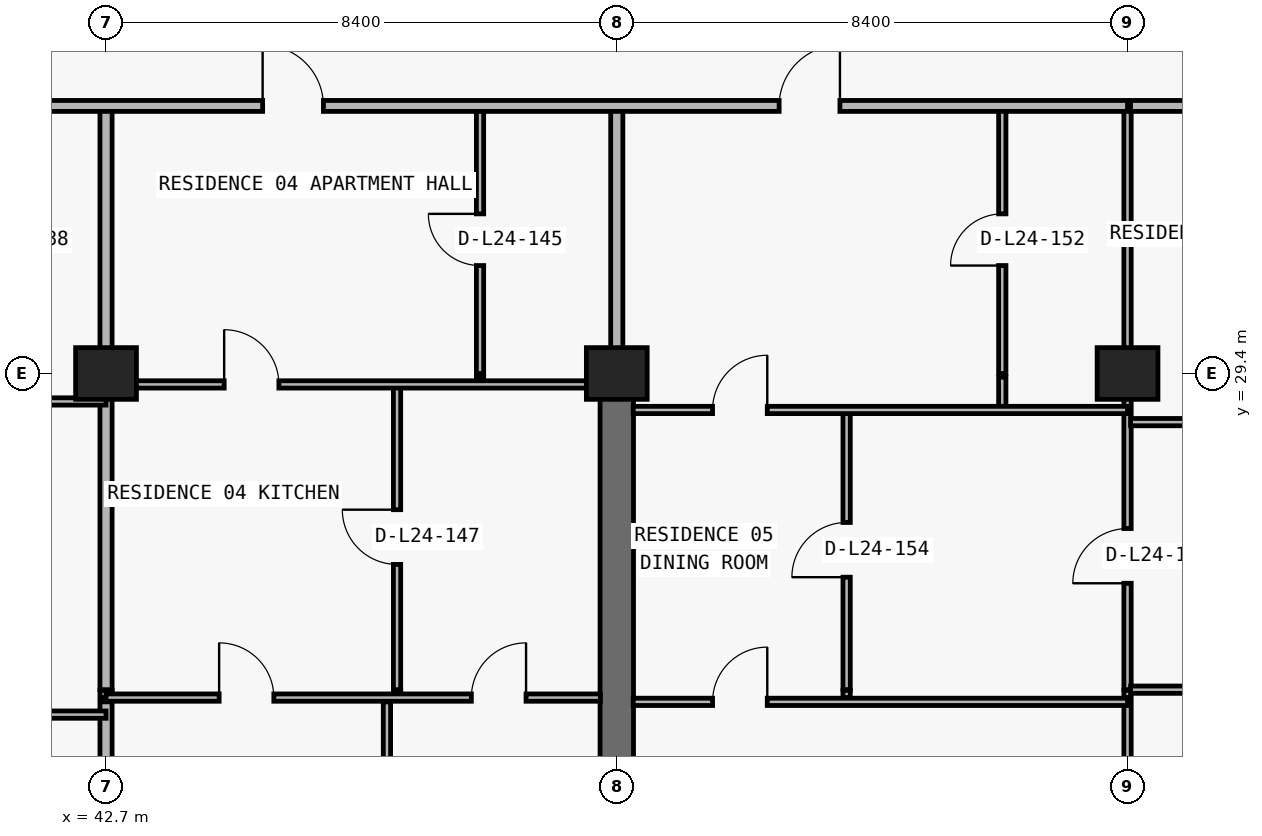
"""IFC4 building model, lengths in metres.
Left out: names, types, materials, properties, quantities, classifications, styles, units other than length and angle.
Written with IfcOpenShell. Run it as: python <this file> out.ifc"""

import sys

from ifc_helpers import new_model, si_unit, direction, frame, frame_2d, origin, origin_2d, place, context, subcontext, project, spatial, rectangle, extrude, element, fill, save


model = new_model("IFC4")
c1 = context("Model", 3, precision=1e-05, world=origin(), true_north=direction((0.0, 1.0)))
c2 = subcontext(c1, "Body", "Model", "MODEL_VIEW")
j1 = project(units=[si_unit("LENGTHUNIT", "METRE"), si_unit("PLANEANGLEUNIT", "RADIAN")], contexts=[c1])
p1 = place(None, origin())
s1 = spatial("IfcSite", under=j1, at=p1, CompositionType="ELEMENT")
p2 = place(p1, origin())
s2 = spatial("IfcBuilding", under=s1, at=p2, CompositionType="ELEMENT")
p3 = place(p2, frame((0.0, 0.0, 91.2)))
s3 = spatial("IfcBuildingStorey", under=s2, at=p3, CompositionType="ELEMENT", Elevation=91.2)
for number, where, z_axis, x_axis in (
    (1, (42.7, 29.4, 0.0), (0.0, 0.0, 1.0), (1.0, 0.0, 0.0)),
    (2, (51.1, 29.4, 0.0), (0.0, 0.0, 1.0), (1.0, 0.0, 0.0)),
    (3, (59.5, 29.4, 0.0), (0.0, 0.0, 1.0), (1.0, 0.0, 0.0)),
):
    element("IfcColumn", number, at=place(p3, frame(where, z_axis=z_axis, x_axis=x_axis)), inside=s3, PredefinedType="COLUMN", context=c2, shape_type="SweptSolid", body=[
        extrude(rectangle(XDim=1.0, YDim=0.85, at=origin_2d()), origin(), (0.0, 0.0, 1.0), 3.05),
    ])
p4 = place(p3, frame((51.1, 20.8, 0.0), z_axis=(0.0, 0.0, 1.0), x_axis=(0.0, 1.0, 0.0)))
e4 = element("IfcWall", 4, at=p4, inside=s3, PredefinedType="SHEAR", context=c2, shape_type="SweptSolid", body=[
    extrude(rectangle(XDim=8.6, YDim=0.55, at=frame_2d((4.3, 0.0))), origin(), (0.0, 0.0, 1.0), 3.05),
])
p5 = place(p3, frame((42.7, 8.84, 0.0), z_axis=(0.0, 0.0, 1.0), x_axis=(0.0, 1.0, 0.0)))
e5 = element("IfcWall", 5, at=p5, inside=s3, PredefinedType="PARTITIONING", context=c2, shape_type="SweptSolid", body=[
    extrude(rectangle(XDim=15.16, YDim=0.2, at=frame_2d((7.58, 0.0))), origin(), (0.0, 0.0, 1.0), 2.174),
])
p6 = place(p3, frame((42.7, 24.07, 0.0), z_axis=(0.0, 0.0, 1.0), x_axis=(0.0, 1.0, 0.0)))
e6 = element("IfcWall", 6, at=p6, inside=s3, PredefinedType="PARTITIONING", context=c2, shape_type="SweptSolid", body=[
    extrude(rectangle(XDim=0.12, YDim=0.2, at=frame_2d((0.06, 0.0))), origin(), (0.0, 0.0, 1.0), 2.174),
])
p7 = place(p3, frame((42.7, 24.2, 0.0), z_axis=(0.0, 0.0, 1.0), x_axis=(0.0, 1.0, 0.0)))
e7 = element("IfcWall", 7, at=p7, inside=s3, PredefinedType="PARTITIONING", context=c2, shape_type="SweptSolid", body=[
    extrude(rectangle(XDim=5.14, YDim=0.2, at=frame_2d((2.57, 0.0))), origin(), (0.0, 0.0, 1.0), 2.174),
])
p8 = place(p3, frame((42.7, 29.4, 0.0), z_axis=(0.0, 0.0, 1.0), x_axis=(0.0, 1.0, 0.0)))
e8 = element("IfcWall", 8, at=p8, inside=s3, PredefinedType="PARTITIONING", context=c2, shape_type="SweptSolid", body=[
    extrude(rectangle(XDim=4.4, YDim=0.2, at=frame_2d((2.2, 0.0))), origin(), (0.0, 0.0, 1.0), 2.174),
])
p9 = place(p3, frame((47.32, 8.84, 0.0), z_axis=(0.0, 0.0, 1.0), x_axis=(0.0, 1.0, 0.0)))
e9 = element("IfcWall", 9, at=p9, inside=s3, PredefinedType="PARTITIONING", context=c2, shape_type="SweptSolid", body=[
    extrude(rectangle(XDim=15.16, YDim=0.12, at=frame_2d((7.58, 0.0))), origin(), (0.0, 0.0, 1.0), 3.05),
])
p10 = place(p3, frame((47.486, 24.07, 0.0), z_axis=(0.0, 0.0, 1.0), x_axis=(0.0, 1.0, 0.0)))
e10 = element("IfcWall", 10, at=p10, inside=s3, PredefinedType="PARTITIONING", context=c2, shape_type="SweptSolid", body=[
    extrude(rectangle(XDim=0.12, YDim=0.12, at=frame_2d((0.06, 0.0))), origin(), (0.0, 0.0, 1.0), 3.05),
])
p11 = place(p3, frame((47.486, 24.2, 0.0), z_axis=(0.0, 0.0, 1.0), x_axis=(0.0, 1.0, 0.0)))
e11 = element("IfcWall", 11, at=p11, inside=s3, PredefinedType="PARTITIONING", context=c2, shape_type="SweptSolid", body=[
    extrude(rectangle(XDim=5.02, YDim=0.12, at=frame_2d((2.51, 0.0))), origin(), (0.0, 0.0, 1.0), 3.05),
])
p12 = place(p11, frame((2.06, 0.0, 0.0)))
e12 = element("IfcOpeningElement", 12, at=p12, cuts=e11, PredefinedType="OPENING", context=c2, shape_type="SweptSolid", body=[
    extrude(rectangle(XDim=0.9, YDim=2.15, at=frame_2d((0.45, 1.075))), frame((0.0, 0.07, 0.0), z_axis=(0.0, -1.0, 0.0), x_axis=(1.0, 0.0, 0.0)), (0.0, 0.0, 1.0), 0.14),
])
p13 = place(p3, frame((48.851, 29.22, 0.0), z_axis=(0.0, 0.0, 1.0), x_axis=(0.0, 1.0, 0.0)))
e13 = element("IfcWall", 13, at=p13, inside=s3, PredefinedType="PARTITIONING", context=c2, shape_type="SweptSolid", body=[
    extrude(rectangle(XDim=0.12, YDim=0.12, at=frame_2d((0.06, 0.0))), origin(), (0.0, 0.0, 1.0), 3.05),
])
p14 = place(p3, frame((48.851, 29.4, 0.0), z_axis=(0.0, 0.0, 1.0), x_axis=(0.0, 1.0, 0.0)))
e14 = element("IfcWall", 14, at=p14, inside=s3, PredefinedType="PARTITIONING", context=c2, shape_type="SweptSolid", body=[
    extrude(rectangle(XDim=4.4, YDim=0.12, at=frame_2d((2.2, 0.0))), origin(), (0.0, 0.0, 1.0), 3.05),
])
p15 = place(p14, frame((1.775, 0.0, 0.0)))
e15 = element("IfcOpeningElement", 15, at=p15, cuts=e14, PredefinedType="OPENING", context=c2, shape_type="SweptSolid", body=[
    extrude(rectangle(XDim=0.85, YDim=2.1, at=frame_2d((0.425, 1.05))), frame((0.0, 0.07, 0.0), z_axis=(0.0, -1.0, 0.0), x_axis=(1.0, 0.0, 0.0)), (0.0, 0.0, 1.0), 0.14),
])
p16 = place(p3, frame((51.1, 29.405, 0.0), z_axis=(0.0, 0.0, 1.0), x_axis=(0.0, 1.0, 0.0)))
e16 = element("IfcWall", 16, at=p16, inside=s3, PredefinedType="PARTITIONING", context=c2, shape_type="SweptSolid", body=[
    extrude(rectangle(XDim=4.395, YDim=0.2, at=frame_2d((2.198, 0.0))), origin(), (0.0, 0.0, 1.0), 2.335),
])
p17 = place(p3, frame((54.88, 24.07, 0.0), z_axis=(0.0, 0.0, 1.0), x_axis=(0.0, 1.0, 0.0)))
e17 = element("IfcWall", 17, at=p17, inside=s3, PredefinedType="PARTITIONING", context=c2, shape_type="SweptSolid", body=[
    extrude(rectangle(XDim=0.12, YDim=0.12, at=frame_2d((0.06, 0.0))), origin(), (0.0, 0.0, 1.0), 3.05),
])
p18 = place(p3, frame((54.88, 24.2, 0.0), z_axis=(0.0, 0.0, 1.0), x_axis=(0.0, 1.0, 0.0)))
e18 = element("IfcWall", 18, at=p18, inside=s3, PredefinedType="PARTITIONING", context=c2, shape_type="SweptSolid", body=[
    extrude(rectangle(XDim=4.6, YDim=0.12, at=frame_2d((2.3, 0.0))), origin(), (0.0, 0.0, 1.0), 3.05),
])
p19 = place(p18, frame((1.85, 0.0, 0.0)))
e19 = element("IfcOpeningElement", 19, at=p19, cuts=e18, PredefinedType="OPENING", context=c2, shape_type="SweptSolid", body=[
    extrude(rectangle(XDim=0.9, YDim=2.15, at=frame_2d((0.45, 1.075))), frame((0.0, 0.07, 0.0), z_axis=(0.0, -1.0, 0.0), x_axis=(1.0, 0.0, 0.0)), (0.0, 0.0, 1.0), 0.14),
])
p20 = place(p3, frame((57.44, 28.8, 0.0), z_axis=(0.0, 0.0, 1.0), x_axis=(0.0, 1.0, 0.0)))
e20 = element("IfcWall", 20, at=p20, inside=s3, PredefinedType="PARTITIONING", context=c2, shape_type="SweptSolid", body=[
    extrude(rectangle(XDim=0.54, YDim=0.12, at=frame_2d((0.27, 0.0))), origin(), (0.0, 0.0, 1.0), 3.05),
])
p21 = place(p3, frame((57.44, 29.4, 0.0), z_axis=(0.0, 0.0, 1.0), x_axis=(0.0, 1.0, 0.0)))
e21 = element("IfcWall", 21, at=p21, inside=s3, PredefinedType="PARTITIONING", context=c2, shape_type="SweptSolid", body=[
    extrude(rectangle(XDim=4.4, YDim=0.12, at=frame_2d((2.2, 0.0))), origin(), (0.0, 0.0, 1.0), 3.05),
])
p22 = place(p21, frame((1.775, 0.0, 0.0)))
e22 = element("IfcOpeningElement", 22, at=p22, cuts=e21, PredefinedType="OPENING", context=c2, shape_type="SweptSolid", body=[
    extrude(rectangle(XDim=0.85, YDim=2.1, at=frame_2d((0.425, 1.05))), frame((0.0, 0.07, 0.0), z_axis=(0.0, -1.0, 0.0), x_axis=(1.0, 0.0, 0.0)), (0.0, 0.0, 1.0), 0.14),
])
p23 = place(p3, frame((59.5, 8.84, 0.0), z_axis=(0.0, 0.0, 1.0), x_axis=(0.0, 1.0, 0.0)))
e23 = element("IfcWall", 23, at=p23, inside=s3, PredefinedType="PARTITIONING", context=c2, shape_type="SweptSolid", body=[
    extrude(rectangle(XDim=15.16, YDim=0.12, at=frame_2d((7.58, 0.0))), origin(), (0.0, 0.0, 1.0), 2.174),
])
p24 = place(p3, frame((59.5, 24.07, 0.0), z_axis=(0.0, 0.0, 1.0), x_axis=(0.0, 1.0, 0.0)))
e24 = element("IfcWall", 24, at=p24, inside=s3, PredefinedType="PARTITIONING", context=c2, shape_type="SweptSolid", body=[
    extrude(rectangle(XDim=0.12, YDim=0.12, at=frame_2d((0.06, 0.0))), origin(), (0.0, 0.0, 1.0), 2.174),
])
p25 = place(p3, frame((59.5, 24.2, 0.0), z_axis=(0.0, 0.0, 1.0), x_axis=(0.0, 1.0, 0.0)))
e25 = element("IfcWall", 25, at=p25, inside=s3, PredefinedType="PARTITIONING", context=c2, shape_type="SweptSolid", body=[
    extrude(rectangle(XDim=5.14, YDim=0.12, at=frame_2d((2.57, 0.0))), origin(), (0.0, 0.0, 1.0), 2.174),
])
p26 = place(p25, frame((1.75, 0.0, 0.0)))
e26 = element("IfcOpeningElement", 26, at=p26, cuts=e25, PredefinedType="OPENING", context=c2, shape_type="SweptSolid", body=[
    extrude(rectangle(XDim=0.9, YDim=2.124, at=frame_2d((0.45, 1.062))), frame((0.0, 0.07, 0.0), z_axis=(0.0, -1.0, 0.0), x_axis=(1.0, 0.0, 0.0)), (0.0, 0.0, 1.0), 0.14),
])
p27 = place(p3, frame((59.5, 29.4, 0.0), z_axis=(0.0, 0.0, 1.0), x_axis=(0.0, 1.0, 0.0)))
e27 = element("IfcWall", 27, at=p27, inside=s3, PredefinedType="PARTITIONING", context=c2, shape_type="SweptSolid", body=[
    extrude(rectangle(XDim=4.4, YDim=0.12, at=frame_2d((2.2, 0.0))), origin(), (0.0, 0.0, 1.0), 2.174),
])
p28 = place(p3, frame((35.1, 23.79, 0.0), z_axis=(0.0, 0.0, 1.0), x_axis=(1.0, 0.0, 0.0)))
e28 = element("IfcWall", 28, at=p28, inside=s3, PredefinedType="PARTITIONING", context=c2, shape_type="SweptSolid", body=[
    extrude(rectangle(XDim=7.6, YDim=0.12, at=frame_2d((3.8, 0.0))), origin(), (0.0, 0.0, 1.0), 3.05),
])
p29 = place(p28, frame((1.336, 0.0, 0.0)))
e29 = element("IfcOpeningElement", 29, at=p29, cuts=e28, PredefinedType="OPENING", context=c2, shape_type="SweptSolid", body=[
    extrude(rectangle(XDim=0.9, YDim=2.15, at=frame_2d((0.45, 1.075))), frame((0.0, 0.07, 0.0), z_axis=(0.0, -1.0, 0.0), x_axis=(1.0, 0.0, 0.0)), (0.0, 0.0, 1.0), 0.14),
])
p30 = place(p28, frame((5.402, 0.0, 0.0)))
e30 = element("IfcOpeningElement", 30, at=p30, cuts=e28, PredefinedType="OPENING", context=c2, shape_type="SweptSolid", body=[
    extrude(rectangle(XDim=0.9, YDim=2.15, at=frame_2d((0.45, 1.075))), frame((0.0, 0.07, 0.0), z_axis=(0.0, -1.0, 0.0), x_axis=(1.0, 0.0, 0.0)), (0.0, 0.0, 1.0), 0.14),
])
p31 = place(p3, frame((51.37, 24.0, 0.0), z_axis=(0.0, 0.0, 1.0), x_axis=(1.0, 0.0, 0.0)))
e31 = element("IfcWall", 31, at=p31, inside=s3, PredefinedType="PARTITIONING", context=c2, shape_type="SweptSolid", body=[
    extrude(rectangle(XDim=8.13, YDim=0.12, at=frame_2d((4.065, 0.0))), origin(), (0.0, 0.0, 1.0), 3.05),
])
p32 = place(p31, frame((1.305, 0.0, 0.0)))
e32 = element("IfcOpeningElement", 32, at=p32, cuts=e31, PredefinedType="OPENING", context=c2, shape_type="SweptSolid", body=[
    extrude(rectangle(XDim=0.9, YDim=2.15, at=frame_2d((0.45, 1.075))), frame((0.0, 0.07, 0.0), z_axis=(0.0, -1.0, 0.0), x_axis=(1.0, 0.0, 0.0)), (0.0, 0.0, 1.0), 0.14),
])
p33 = place(p3, frame((42.7, 24.07, 0.0), z_axis=(0.0, 0.0, 1.0), x_axis=(1.0, 0.0, 0.0)))
e33 = element("IfcWall", 33, at=p33, inside=s3, PredefinedType="PARTITIONING", context=c2, shape_type="SweptSolid", body=[
    extrude(rectangle(XDim=8.13, YDim=0.12, at=frame_2d((4.065, 0.0))), origin(), (0.0, 0.0, 1.0), 3.05),
])
p34 = place(p33, frame((1.86, 0.0, 0.0)))
e34 = element("IfcOpeningElement", 34, at=p34, cuts=e33, PredefinedType="OPENING", context=c2, shape_type="SweptSolid", body=[
    extrude(rectangle(XDim=0.9, YDim=2.15, at=frame_2d((0.45, 1.075))), frame((0.0, 0.07, 0.0), z_axis=(0.0, -1.0, 0.0), x_axis=(1.0, 0.0, 0.0)), (0.0, 0.0, 1.0), 0.14),
])
p35 = place(p33, frame((6.008, 0.0, 0.0)))
e35 = element("IfcOpeningElement", 35, at=p35, cuts=e33, PredefinedType="OPENING", context=c2, shape_type="SweptSolid", body=[
    extrude(rectangle(XDim=0.9, YDim=2.15, at=frame_2d((0.45, 1.075))), frame((0.0, 0.07, 0.0), z_axis=(0.0, -1.0, 0.0), x_axis=(1.0, 0.0, 0.0)), (0.0, 0.0, 1.0), 0.14),
])
p36 = place(p3, frame((59.55, 24.2, 0.0), z_axis=(0.0, 0.0, 1.0), x_axis=(1.0, 0.0, 0.0)))
e36 = element("IfcWall", 36, at=p36, inside=s3, PredefinedType="PARTITIONING", context=c2, shape_type="SweptSolid", body=[
    extrude(rectangle(XDim=8.35, YDim=0.12, at=frame_2d((4.175, 0.0))), origin(), (0.0, 0.0, 1.0), 3.05),
])
p37 = place(p36, frame((3.725, 0.0, 0.0)))
e37 = element("IfcOpeningElement", 37, at=p37, cuts=e36, PredefinedType="OPENING", context=c2, shape_type="SweptSolid", body=[
    extrude(rectangle(XDim=0.9, YDim=2.15, at=frame_2d((0.45, 1.075))), frame((0.0, 0.07, 0.0), z_axis=(0.0, -1.0, 0.0), x_axis=(1.0, 0.0, 0.0)), (0.0, 0.0, 1.0), 0.14),
])
p38 = place(p3, frame((59.55, 28.6, 0.0), z_axis=(0.0, 0.0, 1.0), x_axis=(1.0, 0.0, 0.0)))
e38 = element("IfcWall", 38, at=p38, inside=s3, PredefinedType="PARTITIONING", context=c2, shape_type="SweptSolid", body=[
    extrude(rectangle(XDim=8.35, YDim=0.12, at=frame_2d((4.175, 0.0))), origin(), (0.0, 0.0, 1.0), 3.05),
])
p39 = place(p38, frame((2.802, 0.0, 0.0)))
e39 = element("IfcOpeningElement", 39, at=p39, cuts=e38, PredefinedType="OPENING", context=c2, shape_type="SweptSolid", body=[
    extrude(rectangle(XDim=0.9, YDim=2.15, at=frame_2d((0.45, 1.075))), frame((0.0, 0.07, 0.0), z_axis=(0.0, -1.0, 0.0), x_axis=(1.0, 0.0, 0.0)), (0.0, 0.0, 1.0), 0.14),
])
p40 = place(p3, frame((51.37, 28.8, 0.0), z_axis=(0.0, 0.0, 1.0), x_axis=(1.0, 0.0, 0.0)))
e40 = element("IfcWall", 40, at=p40, inside=s3, PredefinedType="PARTITIONING", context=c2, shape_type="SweptSolid", body=[
    extrude(rectangle(XDim=8.13, YDim=0.12, at=frame_2d((4.065, 0.0))), origin(), (0.0, 0.0, 1.0), 3.05),
])
p41 = place(p40, frame((1.305, 0.0, 0.0)))
e41 = element("IfcOpeningElement", 41, at=p41, cuts=e40, PredefinedType="OPENING", context=c2, shape_type="SweptSolid", body=[
    extrude(rectangle(XDim=0.9, YDim=2.15, at=frame_2d((0.45, 1.075))), frame((0.0, 0.07, 0.0), z_axis=(0.0, -1.0, 0.0), x_axis=(1.0, 0.0, 0.0)), (0.0, 0.0, 1.0), 0.14),
])
p42 = place(p3, frame((35.1, 28.94, 0.0), z_axis=(0.0, 0.0, 1.0), x_axis=(1.0, 0.0, 0.0)))
e42 = element("IfcWall", 42, at=p42, inside=s3, PredefinedType="PARTITIONING", context=c2, shape_type="SweptSolid", body=[
    extrude(rectangle(XDim=7.6, YDim=0.12, at=frame_2d((3.8, 0.0))), origin(), (0.0, 0.0, 1.0), 3.05),
])
p43 = place(p42, frame((1.602, 0.0, 0.0)))
e43 = element("IfcOpeningElement", 43, at=p43, cuts=e42, PredefinedType="OPENING", context=c2, shape_type="SweptSolid", body=[
    extrude(rectangle(XDim=0.9, YDim=2.15, at=frame_2d((0.45, 1.075))), frame((0.0, 0.07, 0.0), z_axis=(0.0, -1.0, 0.0), x_axis=(1.0, 0.0, 0.0)), (0.0, 0.0, 1.0), 0.14),
])
p44 = place(p3, frame((42.7, 29.22, 0.0), z_axis=(0.0, 0.0, 1.0), x_axis=(1.0, 0.0, 0.0)))
e44 = element("IfcWall", 44, at=p44, inside=s3, PredefinedType="PARTITIONING", context=c2, shape_type="SweptSolid", body=[
    extrude(rectangle(XDim=8.13, YDim=0.12, at=frame_2d((4.065, 0.0))), origin(), (0.0, 0.0, 1.0), 2.174),
])
p45 = place(p44, frame((1.943, 0.0, 0.0)))
e45 = element("IfcOpeningElement", 45, at=p45, cuts=e44, PredefinedType="OPENING", context=c2, shape_type="SweptSolid", body=[
    extrude(rectangle(XDim=0.9, YDim=2.124, at=frame_2d((0.45, 1.062))), frame((0.0, 0.07, 0.0), z_axis=(0.0, -1.0, 0.0), x_axis=(1.0, 0.0, 0.0)), (0.0, 0.0, 1.0), 0.14),
])
p46 = place(p3, frame((18.3, 33.8, 0.0), z_axis=(0.0, 0.0, 1.0), x_axis=(1.0, 0.0, 0.0)))
e46 = element("IfcWall", 46, at=p46, inside=s3, PredefinedType="PARTITIONING", context=c2, shape_type="SweptSolid", body=[
    extrude(rectangle(XDim=41.2, YDim=0.18, at=frame_2d((20.6, 0.0))), origin(), (0.0, 0.0, 1.0), 3.05),
])
p47 = place(p46, frame((10.946, 0.0, 0.0)))
e47 = element("IfcOpeningElement", 47, at=p47, cuts=e46, PredefinedType="OPENING", context=c2, shape_type="SweptSolid", body=[
    extrude(rectangle(XDim=1.0, YDim=2.2, at=frame_2d((0.5, 1.1))), frame((0.0, 0.1, 0.0), z_axis=(0.0, -1.0, 0.0), x_axis=(1.0, 0.0, 0.0)), (0.0, 0.0, 1.0), 0.2),
])
p48 = place(p46, frame((19.113, 0.0, 0.0)))
e48 = element("IfcOpeningElement", 48, at=p48, cuts=e46, PredefinedType="OPENING", context=c2, shape_type="SweptSolid", body=[
    extrude(rectangle(XDim=1.0, YDim=2.2, at=frame_2d((0.5, 1.1))), frame((0.0, 0.1, 0.0), z_axis=(0.0, -1.0, 0.0), x_axis=(1.0, 0.0, 0.0)), (0.0, 0.0, 1.0), 0.2),
])
p49 = place(p46, frame((26.976, 0.0, 0.0)))
e49 = element("IfcOpeningElement", 49, at=p49, cuts=e46, PredefinedType="OPENING", context=c2, shape_type="SweptSolid", body=[
    extrude(rectangle(XDim=1.0, YDim=2.2, at=frame_2d((0.5, 1.1))), frame((0.0, 0.1, 0.0), z_axis=(0.0, -1.0, 0.0), x_axis=(1.0, 0.0, 0.0)), (0.0, 0.0, 1.0), 0.2),
])
p50 = place(p46, frame((35.47, 0.0, 0.0)))
e50 = element("IfcOpeningElement", 50, at=p50, cuts=e46, PredefinedType="OPENING", context=c2, shape_type="SweptSolid", body=[
    extrude(rectangle(XDim=1.0, YDim=2.2, at=frame_2d((0.5, 1.1))), frame((0.0, 0.1, 0.0), z_axis=(0.0, -1.0, 0.0), x_axis=(1.0, 0.0, 0.0)), (0.0, 0.0, 1.0), 0.2),
])
p51 = place(p3, frame((59.55, 33.8, 0.0), z_axis=(0.0, 0.0, 1.0), x_axis=(1.0, 0.0, 0.0)))
e51 = element("IfcWall", 51, at=p51, inside=s3, PredefinedType="PARTITIONING", context=c2, shape_type="SweptSolid", body=[
    extrude(rectangle(XDim=10.55, YDim=0.18, at=frame_2d((5.275, 0.0))), origin(), (0.0, 0.0, 1.0), 3.05),
])
p52 = place(p49, origin())
e52 = element("IfcDoor", 52, at=p52, inside=s3, OperationType="SINGLE_SWING_LEFT", PredefinedType="DOOR", context=c2, shape_type="SweptSolid", body=[
    extrude(rectangle(XDim=1.0, YDim=2.2, at=frame_2d((0.5, 1.1))), frame((0.0, 0.025, 0.0), z_axis=(0.0, -1.0, 0.0), x_axis=(1.0, 0.0, 0.0)), (0.0, 0.0, 1.0), 0.05),
])
fill(e49, e52)
p53 = place(p15, origin())
e53 = element("IfcDoor", 53, at=p53, inside=s3, OperationType="SINGLE_SWING_RIGHT", PredefinedType="DOOR", context=c2, shape_type="SweptSolid", body=[
    extrude(rectangle(XDim=0.85, YDim=2.1, at=frame_2d((0.425, 1.05))), frame((0.0, 0.025, 0.0), z_axis=(0.0, -1.0, 0.0), x_axis=(1.0, 0.0, 0.0)), (0.0, 0.0, 1.0), 0.05),
])
fill(e15, e53)
p54 = place(p45, origin())
e54 = element("IfcDoor", 54, at=p54, inside=s3, OperationType="SINGLE_SWING_LEFT", PredefinedType="DOOR", context=c2, shape_type="SweptSolid", body=[
    extrude(rectangle(XDim=0.9, YDim=2.124, at=frame_2d((0.45, 1.062))), frame((0.0, 0.025, 0.0), z_axis=(0.0, -1.0, 0.0), x_axis=(1.0, 0.0, 0.0)), (0.0, 0.0, 1.0), 0.05),
])
fill(e45, e54)
p55 = place(p12, origin())
e55 = element("IfcDoor", 55, at=p55, inside=s3, OperationType="SINGLE_SWING_RIGHT", PredefinedType="DOOR", context=c2, shape_type="SweptSolid", body=[
    extrude(rectangle(XDim=0.9, YDim=2.15, at=frame_2d((0.45, 1.075))), frame((0.0, 0.025, 0.0), z_axis=(0.0, -1.0, 0.0), x_axis=(1.0, 0.0, 0.0)), (0.0, 0.0, 1.0), 0.05),
])
fill(e12, e55)
p56 = place(p34, origin())
e56 = element("IfcDoor", 56, at=p56, inside=s3, OperationType="SINGLE_SWING_LEFT", PredefinedType="DOOR", context=c2, shape_type="SweptSolid", body=[
    extrude(rectangle(XDim=0.9, YDim=2.15, at=frame_2d((0.45, 1.075))), frame((0.0, 0.025, 0.0), z_axis=(0.0, -1.0, 0.0), x_axis=(1.0, 0.0, 0.0)), (0.0, 0.0, 1.0), 0.05),
])
fill(e34, e56)
p57 = place(p35, origin())
e57 = element("IfcDoor", 57, at=p57, inside=s3, OperationType="SINGLE_SWING_RIGHT", PredefinedType="DOOR", context=c2, shape_type="SweptSolid", body=[
    extrude(rectangle(XDim=0.9, YDim=2.15, at=frame_2d((0.45, 1.075))), frame((0.0, 0.025, 0.0), z_axis=(0.0, -1.0, 0.0), x_axis=(1.0, 0.0, 0.0)), (0.0, 0.0, 1.0), 0.05),
])
fill(e35, e57)
p58 = place(p50, origin())
e58 = element("IfcDoor", 58, at=p58, inside=s3, OperationType="SINGLE_SWING_RIGHT", PredefinedType="DOOR", context=c2, shape_type="SweptSolid", body=[
    extrude(rectangle(XDim=1.0, YDim=2.2, at=frame_2d((0.5, 1.1))), frame((0.0, 0.025, 0.0), z_axis=(0.0, -1.0, 0.0), x_axis=(1.0, 0.0, 0.0)), (0.0, 0.0, 1.0), 0.05),
])
fill(e50, e58)
p59 = place(p22, origin())
e59 = element("IfcDoor", 59, at=p59, inside=s3, OperationType="SINGLE_SWING_LEFT", PredefinedType="DOOR", context=c2, shape_type="SweptSolid", body=[
    extrude(rectangle(XDim=0.85, YDim=2.1, at=frame_2d((0.425, 1.05))), frame((0.0, 0.025, 0.0), z_axis=(0.0, -1.0, 0.0), x_axis=(1.0, 0.0, 0.0)), (0.0, 0.0, 1.0), 0.05),
])
fill(e22, e59)
p60 = place(p41, origin())
e60 = element("IfcDoor", 60, at=p60, inside=s3, OperationType="SINGLE_SWING_RIGHT", PredefinedType="DOOR", context=c2, shape_type="SweptSolid", body=[
    extrude(rectangle(XDim=0.9, YDim=2.15, at=frame_2d((0.45, 1.075))), frame((0.0, 0.025, 0.0), z_axis=(0.0, -1.0, 0.0), x_axis=(1.0, 0.0, 0.0)), (0.0, 0.0, 1.0), 0.05),
])
fill(e41, e60)
p61 = place(p19, origin())
e61 = element("IfcDoor", 61, at=p61, inside=s3, OperationType="SINGLE_SWING_LEFT", PredefinedType="DOOR", context=c2, shape_type="SweptSolid", body=[
    extrude(rectangle(XDim=0.9, YDim=2.15, at=frame_2d((0.45, 1.075))), frame((0.0, 0.025, 0.0), z_axis=(0.0, -1.0, 0.0), x_axis=(1.0, 0.0, 0.0)), (0.0, 0.0, 1.0), 0.05),
])
fill(e19, e61)
p62 = place(p32, origin())
e62 = element("IfcDoor", 62, at=p62, inside=s3, OperationType="SINGLE_SWING_RIGHT", PredefinedType="DOOR", context=c2, shape_type="SweptSolid", body=[
    extrude(rectangle(XDim=0.9, YDim=2.15, at=frame_2d((0.45, 1.075))), frame((0.0, 0.025, 0.0), z_axis=(0.0, -1.0, 0.0), x_axis=(1.0, 0.0, 0.0)), (0.0, 0.0, 1.0), 0.05),
])
fill(e32, e62)
p63 = place(p26, origin())
e63 = element("IfcDoor", 63, at=p63, inside=s3, OperationType="SINGLE_SWING_LEFT", PredefinedType="DOOR", context=c2, shape_type="SweptSolid", body=[
    extrude(rectangle(XDim=0.9, YDim=2.124, at=frame_2d((0.45, 1.062))), frame((0.0, 0.025, 0.0), z_axis=(0.0, -1.0, 0.0), x_axis=(1.0, 0.0, 0.0)), (0.0, 0.0, 1.0), 0.05),
])
fill(e26, e63)
save(model, sys.argv[1])
